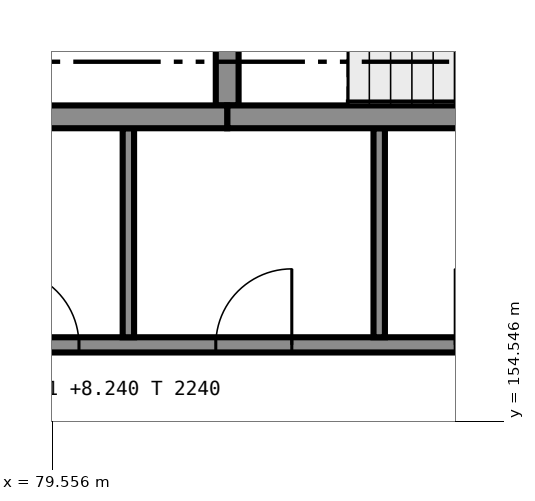
"""IFC4 building model, lengths in metres.
Left out: names, types, materials, properties, quantities, classifications, styles, units other than length and angle.
Written with IfcOpenShell. Run it as: python <this file> out.ifc"""

import sys

from ifc_helpers import new_model, si_unit, direction, frame, frame_2d, origin, place, context, subcontext, project, spatial, rectangle, extrude, element, fill, save


model = new_model("IFC4")
c1 = context("Model", 3, precision=1e-05, world=origin(), true_north=direction((0.0, 1.0)))
c2 = subcontext(c1, "Body", "Model", "MODEL_VIEW")
j1 = project(units=[si_unit("LENGTHUNIT", "METRE"), si_unit("PLANEANGLEUNIT", "RADIAN")], contexts=[c1])
p1 = place(None, origin())
s1 = spatial("IfcSite", under=j1, at=p1, CompositionType="ELEMENT")
p2 = place(p1, origin())
s2 = spatial("IfcBuilding", under=s1, at=p2, CompositionType="ELEMENT")
p3 = place(p2, frame((0.0, 0.0, 6.0)))
s3 = spatial("IfcBuildingStorey", under=s2, at=p3, CompositionType="ELEMENT", Elevation=6.0)
p4 = place(p3, frame((89.7, 158.55, 0.0), z_axis=(0.0, 0.0, 1.0), x_axis=(-1.0, 0.0, 0.0)))
e1 = element("IfcWall", 1, at=p4, inside=s3, PredefinedType="SHEAR", context=c2, shape_type="SweptSolid", body=[
    extrude(rectangle(XDim=7.85, YDim=0.3, at=frame_2d((3.925, 0.0))), origin(), (0.0, 0.0, 1.0), 5.75),
])
p5 = place(p4, frame((0.5, 0.0, 0.0)))
e2 = element("IfcOpeningElement", 2, at=p5, cuts=e1, PredefinedType="OPENING", context=c2, shape_type="SweptSolid", body=[
    extrude(rectangle(XDim=1.0, YDim=2.1, at=frame_2d((0.5, 1.05))), frame((0.0, 0.16, 0.0), z_axis=(0.0, -1.0, 0.0), x_axis=(1.0, 0.0, 0.0)), (0.0, 0.0, 1.0), 0.32),
])
p6 = place(p3, frame((81.85, 158.55, 0.0), z_axis=(0.0, 0.0, 1.0), x_axis=(-1.0, 0.0, 0.0)))
e3 = element("IfcWall", 3, at=p6, inside=s3, PredefinedType="SHEAR", context=c2, shape_type="SweptSolid", body=[
    extrude(rectangle(XDim=3.55, YDim=0.3, at=frame_2d((1.775, 0.0))), origin(), (0.0, 0.0, 1.0), 5.75),
])
p7 = place(p3, frame((81.85, 158.7, 0.0), z_axis=(0.0, 0.0, 1.0), x_axis=(0.0, 1.0, 0.0)))
e4 = element("IfcWall", 4, at=p7, inside=s3, PredefinedType="SHEAR", context=c2, shape_type="SweptSolid", body=[
    extrude(rectangle(XDim=3.3, YDim=0.3, at=frame_2d((1.65, 0.0))), origin(), (0.0, 0.0, 1.0), 5.75),
])
p8 = place(p3, frame((78.3, 155.55, 0.0), z_axis=(0.0, 0.0, 1.0), x_axis=(1.0, 0.0, 0.0)))
e5 = element("IfcWall", 5, at=p8, inside=s3, PredefinedType="PARTITIONING", context=c2, shape_type="SweptSolid", body=[
    extrude(rectangle(XDim=8.65, YDim=0.2, at=frame_2d((4.325, 0.0))), origin(), (0.0, 0.0, 1.0), 5.75),
])
p9 = place(p8, frame((0.6, 0.0, 0.0)))
e6 = element("IfcOpeningElement", 6, at=p9, cuts=e5, PredefinedType="OPENING", context=c2, shape_type="SweptSolid", body=[
    extrude(rectangle(XDim=1.0, YDim=2.1, at=frame_2d((0.5, 1.05))), frame((0.0, 0.11, 0.0), z_axis=(0.0, -1.0, 0.0), x_axis=(1.0, 0.0, 0.0)), (0.0, 0.0, 1.0), 0.22),
])
p10 = place(p8, frame((3.4, 0.0, 0.0)))
e7 = element("IfcOpeningElement", 7, at=p10, cuts=e5, PredefinedType="OPENING", context=c2, shape_type="SweptSolid", body=[
    extrude(rectangle(XDim=1.0, YDim=2.1, at=frame_2d((0.5, 1.05))), frame((0.0, 0.11, 0.0), z_axis=(0.0, -1.0, 0.0), x_axis=(1.0, 0.0, 0.0)), (0.0, 0.0, 1.0), 0.22),
])
p11 = place(p8, frame((6.55, 0.0, 0.0)))
e8 = element("IfcOpeningElement", 8, at=p11, cuts=e5, PredefinedType="OPENING", context=c2, shape_type="SweptSolid", body=[
    extrude(rectangle(XDim=1.0, YDim=2.1, at=frame_2d((0.5, 1.05))), frame((0.0, 0.11, 0.0), z_axis=(0.0, -1.0, 0.0), x_axis=(1.0, 0.0, 0.0)), (0.0, 0.0, 1.0), 0.22),
])
for number, where, z_axis, x_axis in (
    (9, (80.55, 155.65, 0.0), (0.0, 0.0, 1.0), (0.0, 1.0, 0.0)),
    (10, (83.85, 155.65, 0.0), (0.0, 0.0, 1.0), (0.0, 1.0, 0.0)),
):
    element("IfcWall", number, at=place(p3, frame(where, z_axis=z_axis, x_axis=x_axis)), inside=s3, PredefinedType="PARTITIONING", context=c2, shape_type="SweptSolid", body=[
        extrude(rectangle(XDim=2.75, YDim=0.15, at=frame_2d((1.375, 0.0))), origin(), (0.0, 0.0, 1.0), 5.75),
    ])
p12 = place(p9, origin())
e11 = element("IfcDoor", 11, at=p12, inside=s3, OperationType="SINGLE_SWING_RIGHT", PredefinedType="DOOR", context=c2, shape_type="SweptSolid", body=[
    extrude(rectangle(XDim=1.0, YDim=2.1, at=frame_2d((0.5, 1.05))), frame((0.0, 0.025, 0.0), z_axis=(0.0, -1.0, 0.0), x_axis=(1.0, 0.0, 0.0)), (0.0, 0.0, 1.0), 0.05),
])
fill(e6, e11)
p13 = place(p10, origin())
e12 = element("IfcDoor", 12, at=p13, inside=s3, OperationType="SINGLE_SWING_LEFT", PredefinedType="DOOR", context=c2, shape_type="SweptSolid", body=[
    extrude(rectangle(XDim=1.0, YDim=2.1, at=frame_2d((0.5, 1.05))), frame((0.0, 0.025, 0.0), z_axis=(0.0, -1.0, 0.0), x_axis=(1.0, 0.0, 0.0)), (0.0, 0.0, 1.0), 0.05),
])
fill(e7, e12)
save(model, sys.argv[1])
